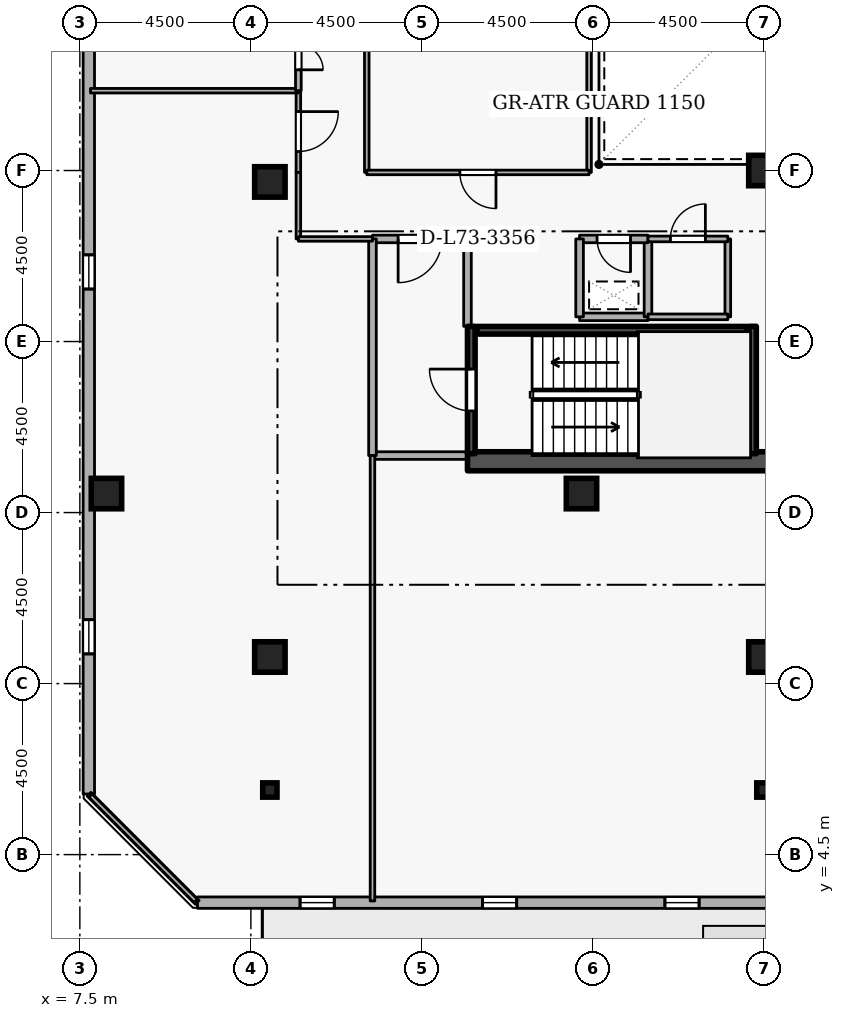
"""IFC4 building model, lengths in metres.
Left out: names, types, materials, properties, quantities, classifications, styles, units other than length and angle.
Written with IfcOpenShell. Run it as: python <this file> out.ifc"""

import sys

from ifc_helpers import new_model, si_unit, direction, frame, frame_2d, origin, origin_2d, place, context, subcontext, project, spatial, rectangle, i_section, extrude, element, fill, save


model = new_model("IFC4")
c1 = context("Model", 3, precision=1e-05, world=origin(), true_north=direction((0.0, 1.0)))
c2 = subcontext(c1, "Body", "Model", "MODEL_VIEW")
j1 = project(units=[si_unit("LENGTHUNIT", "METRE"), si_unit("PLANEANGLEUNIT", "RADIAN")], contexts=[c1])
p1 = place(None, origin())
s1 = spatial("IfcSite", under=j1, at=p1, CompositionType="ELEMENT")
p2 = place(p1, origin())
s2 = spatial("IfcBuilding", under=s1, at=p2, CompositionType="ELEMENT")
p3 = place(p2, frame((0.0, 0.0, 272.7)))
s3 = spatial("IfcBuildingStorey", under=s2, at=p3, CompositionType="ELEMENT", Elevation=272.7)
p4 = place(p3, frame((17.7, 14.85, 0.0), z_axis=(0.0, 0.0, 1.0), x_axis=(1.0, 0.0, 0.0)))
e1 = element("IfcWall", 1, at=p4, inside=s3, PredefinedType="SHEAR", context=c2, shape_type="SweptSolid", body=[
    extrude(rectangle(XDim=15.6, YDim=0.5, at=frame_2d((7.8, 0.0))), origin(), (0.0, 0.0, 1.0), 3.6),
])
for number, where, z_axis, x_axis in (
    (2, (12.5, 9.7, 0.0), (0.0, 0.0, 1.0), (1.0, 0.0, 0.0)),
    (3, (25.5, 9.7, 0.0), (0.0, 0.0, 1.0), (1.0, 0.0, 0.0)),
    (4, (8.2, 14.0, 0.0), (0.0, 0.0, 1.0), (1.0, 0.0, 0.0)),
    (5, (12.5, 22.2, 0.0), (0.0, 0.0, 1.0), (1.0, 0.0, 0.0)),
    (6, (20.7, 14.0, 0.0), (0.0, 0.0, 1.0), (1.0, 0.0, 0.0)),
    (7, (25.5, 22.5, 0.0), (0.0, 0.0, 1.0), (1.0, 0.0, 0.0)),
):
    element("IfcColumn", number, at=place(p3, frame(where, z_axis=z_axis, x_axis=x_axis)), inside=s3, PredefinedType="COLUMN", context=c2, shape_type="SweptSolid", body=[
        extrude(rectangle(XDim=0.8, YDim=0.8, at=origin_2d()), origin(), (0.0, 0.0, 1.0), 3.6),
    ])
for number, where, z_axis, x_axis in (
    (8, (12.5, 6.2, 0.0), (0.0, 0.0, 1.0), (1.0, 0.0, 0.0)),
    (9, (25.5, 6.2, 0.0), (0.0, 0.0, 1.0), (1.0, 0.0, 0.0)),
):
    element("IfcColumn", number, at=place(p3, frame(where, z_axis=z_axis, x_axis=x_axis)), inside=s3, PredefinedType="COLUMN", context=c2, shape_type="SweptSolid", body=[
        extrude(i_section(OverallWidth=0.375, OverallDepth=0.375, WebThickness=0.017, FlangeThickness=0.027, FilletRadius=0.015, at=origin_2d()), origin(), (0.0, 0.0, 1.0), 3.6),
    ])
p5 = place(p3, frame((10.594, 3.236, 0.0), z_axis=(0.0, 0.0, 1.0), x_axis=(0.999999999634, -2.7061402e-05, 0.0)))
e10 = element("IfcWall", 10, at=p5, inside=s3, PredefinedType="STANDARD", context=c2, shape_type="SweptSolid", body=[
    extrude(rectangle(XDim=36.087, YDim=0.3, at=frame_2d((18.043, 0.0))), origin(), (0.0, 0.0, 1.0), 2.7),
])
p6 = place(p5, frame((22.993, 0.0, 0.0)))
e11 = element("IfcOpeningElement", 11, at=p6, cuts=e10, PredefinedType="OPENING", context=c2, shape_type="SweptSolid", body=[
    extrude(rectangle(XDim=1.0, YDim=2.08, at=frame_2d((0.5, 1.04))), frame((0.0, 0.16, 0.0), z_axis=(0.0, -1.0, 0.0), x_axis=(1.0, 0.0, 0.0)), (0.0, 0.0, 1.0), 0.32),
])
p7 = place(p5, frame((2.7, 0.0, 0.72)))
e12 = element("IfcOpeningElement", 12, at=p7, cuts=e10, PredefinedType="OPENING", context=c2, shape_type="SweptSolid", body=[
    extrude(rectangle(XDim=0.9, YDim=1.75, at=frame_2d((0.45, 0.875))), frame((0.0, 0.16, 0.0), z_axis=(0.0, -1.0, 0.0), x_axis=(1.0, 0.0, 0.0)), (0.0, 0.0, 1.0), 0.32),
])
p8 = place(p5, frame((7.5, 0.0, 0.72)))
e13 = element("IfcOpeningElement", 13, at=p8, cuts=e10, PredefinedType="OPENING", context=c2, shape_type="SweptSolid", body=[
    extrude(rectangle(XDim=0.9, YDim=1.75, at=frame_2d((0.45, 0.875))), frame((0.0, 0.16, 0.0), z_axis=(0.0, -1.0, 0.0), x_axis=(1.0, 0.0, 0.0)), (0.0, 0.0, 1.0), 0.32),
])
p9 = place(p5, frame((12.3, 0.0, 0.72)))
e14 = element("IfcOpeningElement", 14, at=p9, cuts=e10, PredefinedType="OPENING", context=c2, shape_type="SweptSolid", body=[
    extrude(rectangle(XDim=0.9, YDim=1.75, at=frame_2d((0.45, 0.875))), frame((0.0, 0.16, 0.0), z_axis=(0.0, -1.0, 0.0), x_axis=(1.0, 0.0, 0.0)), (0.0, 0.0, 1.0), 0.32),
])
p10 = place(p5, frame((17.1, 0.0, 0.72)))
e15 = element("IfcOpeningElement", 15, at=p10, cuts=e10, PredefinedType="OPENING", context=c2, shape_type="SweptSolid", body=[
    extrude(rectangle(XDim=0.9, YDim=1.75, at=frame_2d((0.45, 0.875))), frame((0.0, 0.16, 0.0), z_axis=(0.0, -1.0, 0.0), x_axis=(1.0, 0.0, 0.0)), (0.0, 0.0, 1.0), 0.32),
])
p11 = place(p5, frame((26.7, 0.0, 0.72)))
e16 = element("IfcOpeningElement", 16, at=p11, cuts=e10, PredefinedType="OPENING", context=c2, shape_type="SweptSolid", body=[
    extrude(rectangle(XDim=0.9, YDim=1.75, at=frame_2d((0.45, 0.875))), frame((0.0, 0.16, 0.0), z_axis=(0.0, -1.0, 0.0), x_axis=(1.0, 0.0, 0.0)), (0.0, 0.0, 1.0), 0.32),
])
p12 = place(p5, frame((31.5, 0.0, 0.72)))
e17 = element("IfcOpeningElement", 17, at=p12, cuts=e10, PredefinedType="OPENING", context=c2, shape_type="SweptSolid", body=[
    extrude(rectangle(XDim=0.9, YDim=1.75, at=frame_2d((0.45, 0.875))), frame((0.0, 0.16, 0.0), z_axis=(0.0, -1.0, 0.0), x_axis=(1.0, 0.0, 0.0)), (0.0, 0.0, 1.0), 0.32),
])
p13 = place(p3, frame((7.735, 42.181, 0.0), z_axis=(0.0, 0.0, 1.0), x_axis=(2.7061402e-05, -0.999999999634, 0.0)))
e18 = element("IfcWall", 18, at=p13, inside=s3, PredefinedType="STANDARD", context=c2, shape_type="SweptSolid", body=[
    extrude(rectangle(XDim=36.087, YDim=0.3, at=frame_2d((18.043, 0.0))), origin(), (0.0, 0.0, 1.0), 2.7),
])
p14 = place(p13, frame((7.5, 0.0, 0.72)))
e19 = element("IfcOpeningElement", 19, at=p14, cuts=e18, PredefinedType="OPENING", context=c2, shape_type="SweptSolid", body=[
    extrude(rectangle(XDim=0.9, YDim=1.75, at=frame_2d((0.45, 0.875))), frame((0.0, 0.16, 0.0), z_axis=(0.0, -1.0, 0.0), x_axis=(1.0, 0.0, 0.0)), (0.0, 0.0, 1.0), 0.32),
])
p15 = place(p13, frame((21.9, 0.0, 0.72)))
e20 = element("IfcOpeningElement", 20, at=p15, cuts=e18, PredefinedType="OPENING", context=c2, shape_type="SweptSolid", body=[
    extrude(rectangle(XDim=0.9, YDim=1.75, at=frame_2d((0.45, 0.875))), frame((0.0, 0.16, 0.0), z_axis=(0.0, -1.0, 0.0), x_axis=(1.0, 0.0, 0.0)), (0.0, 0.0, 1.0), 0.32),
])
p16 = place(p13, frame((31.5, 0.0, 0.72)))
e21 = element("IfcOpeningElement", 21, at=p16, cuts=e18, PredefinedType="OPENING", context=c2, shape_type="SweptSolid", body=[
    extrude(rectangle(XDim=0.9, YDim=1.75, at=frame_2d((0.45, 0.875))), frame((0.0, 0.16, 0.0), z_axis=(0.0, -1.0, 0.0), x_axis=(1.0, 0.0, 0.0)), (0.0, 0.0, 1.0), 0.32),
])
p17 = place(p3, frame((17.8, 15.05, 0.0), z_axis=(0.0, 0.0, 1.0), x_axis=(0.0, 1.0, 0.0)))
e22 = element("IfcWall", 22, at=p17, inside=s3, PredefinedType="SHEAR", context=c2, shape_type="SweptSolid", body=[
    extrude(rectangle(XDim=3.35, YDim=0.2, at=frame_2d((1.675, 0.0))), origin(), (0.0, 0.0, 1.0), 3.6),
])
p18 = place(p17, frame((1.125, 0.0, 0.0)))
e23 = element("IfcOpeningElement", 23, at=p18, cuts=e22, PredefinedType="OPENING", context=c2, shape_type="SweptSolid", body=[
    extrude(rectangle(XDim=1.1, YDim=2.1, at=frame_2d((0.55, 1.05))), frame((0.0, 0.11, 0.0), z_axis=(0.0, -1.0, 0.0), x_axis=(1.0, 0.0, 0.0)), (0.0, 0.0, 1.0), 0.22),
])
p19 = place(p3, frame((25.2, 18.4, 0.0), z_axis=(0.0, 0.0, 1.0), x_axis=(0.0, -1.0, 0.0)))
e24 = element("IfcWall", 24, at=p19, inside=s3, PredefinedType="SHEAR", context=c2, shape_type="SweptSolid", body=[
    extrude(rectangle(XDim=3.35, YDim=0.2, at=frame_2d((1.675, 0.0))), origin(), (0.0, 0.0, 1.0), 3.6),
])
p20 = place(p3, frame((25.05, 18.297, 0.0), z_axis=(0.0, 0.0, 1.0), x_axis=(-1.0, 0.0, 0.0)))
e25 = element("IfcWall", 25, at=p20, inside=s3, PredefinedType="SHEAR", context=c2, shape_type="SweptSolid", body=[
    extrude(rectangle(XDim=7.1, YDim=0.2, at=frame_2d((3.55, 0.0))), origin(), (0.0, 0.0, 1.0), 3.6),
])
p21 = place(p3, frame((15.2, 15.0, 0.0), z_axis=(0.0, 0.0, 1.0), x_axis=(1.0, 0.0, 0.0)))
e26 = element("IfcWall", 26, at=p21, inside=s3, PredefinedType="STANDARD", context=c2, shape_type="SweptSolid", body=[
    extrude(rectangle(XDim=2.5, YDim=0.2, at=frame_2d((1.25, 0.0))), origin(), (0.0, 0.0, 1.0), 3.34),
])
p22 = place(p3, frame((17.7, 18.4, 0.0), z_axis=(0.0, 0.0, 1.0), x_axis=(0.0, 1.0, 0.0)))
e27 = element("IfcWall", 27, at=p22, inside=s3, PredefinedType="STANDARD", context=c2, shape_type="SweptSolid", body=[
    extrude(rectangle(XDim=2.3, YDim=0.2, at=frame_2d((1.15, 0.0))), origin(), (0.0, 0.0, 1.0), 2.545),
])
p23 = place(p3, frame((17.7, 20.7, 0.0), z_axis=(0.0, 0.0, 1.0), x_axis=(-1.0, 0.0, 0.0)))
e28 = element("IfcWall", 28, at=p23, inside=s3, PredefinedType="STANDARD", context=c2, shape_type="SweptSolid", body=[
    extrude(rectangle(XDim=2.5, YDim=0.2, at=frame_2d((1.25, 0.0))), origin(), (0.0, 0.0, 1.0), 3.34),
])
p24 = place(p23, frame((0.675, 0.0, 0.0)))
e29 = element("IfcOpeningElement", 29, at=p24, cuts=e28, PredefinedType="OPENING", context=c2, shape_type="SweptSolid", body=[
    extrude(rectangle(XDim=1.15, YDim=2.1, at=frame_2d((0.575, 1.05))), frame((0.0, 0.11, 0.0), z_axis=(0.0, -1.0, 0.0), x_axis=(1.0, 0.0, 0.0)), (0.0, 0.0, 1.0), 0.22),
])
p25 = place(p3, frame((15.2, 20.7, 0.0), z_axis=(0.0, 0.0, 1.0), x_axis=(0.0, -1.0, 0.0)))
e30 = element("IfcWall", 30, at=p25, inside=s3, PredefinedType="STANDARD", context=c2, shape_type="SweptSolid", body=[
    extrude(rectangle(XDim=5.7, YDim=0.2, at=frame_2d((2.85, 0.0))), origin(), (0.0, 0.0, 1.0), 3.34),
])
p26 = place(p3, frame((20.65, 18.65, 0.0), z_axis=(0.0, 0.0, 1.0), x_axis=(1.0, 0.0, 0.0)))
e31 = element("IfcWall", 31, at=p26, inside=s3, PredefinedType="STANDARD", context=c2, shape_type="SweptSolid", body=[
    extrude(rectangle(XDim=1.8, YDim=0.2, at=frame_2d((0.9, 0.0))), origin(), (0.0, 0.0, 1.0), 3.34),
])
p27 = place(p3, frame((22.45, 18.65, 0.0), z_axis=(0.0, 0.0, 1.0), x_axis=(0.0, 1.0, 0.0)))
e32 = element("IfcWall", 32, at=p27, inside=s3, PredefinedType="STANDARD", context=c2, shape_type="SweptSolid", body=[
    extrude(rectangle(XDim=2.05, YDim=0.2, at=frame_2d((1.025, 0.0))), origin(), (0.0, 0.0, 1.0), 3.34),
])
p28 = place(p3, frame((22.45, 20.7, 0.0), z_axis=(0.0, 0.0, 1.0), x_axis=(-1.0, 0.0, 0.0)))
e33 = element("IfcWall", 33, at=p28, inside=s3, PredefinedType="STANDARD", context=c2, shape_type="SweptSolid", body=[
    extrude(rectangle(XDim=1.8, YDim=0.2, at=frame_2d((0.9, 0.0))), origin(), (0.0, 0.0, 1.0), 3.34),
])
p29 = place(p28, frame((0.46, 0.0, 0.0)))
e34 = element("IfcOpeningElement", 34, at=p29, cuts=e33, PredefinedType="OPENING", context=c2, shape_type="SweptSolid", body=[
    extrude(rectangle(XDim=0.88, YDim=2.04, at=frame_2d((0.44, 1.02))), frame((0.0, 0.11, 0.0), z_axis=(0.0, -1.0, 0.0), x_axis=(1.0, 0.0, 0.0)), (0.0, 0.0, 1.0), 0.22),
])
p30 = place(p3, frame((20.65, 20.7, 0.0), z_axis=(0.0, 0.0, 1.0), x_axis=(0.0, -1.0, 0.0)))
e35 = element("IfcWall", 35, at=p30, inside=s3, PredefinedType="STANDARD", context=c2, shape_type="SweptSolid", body=[
    extrude(rectangle(XDim=2.05, YDim=0.2, at=frame_2d((1.025, 0.0))), origin(), (0.0, 0.0, 1.0), 3.34),
])
p31 = place(p3, frame((24.55, 20.7, 0.0), z_axis=(0.0, 0.0, 1.0), x_axis=(0.0, -1.0, 0.0)))
e36 = element("IfcWall", 36, at=p31, inside=s3, PredefinedType="PARTITIONING", context=c2, shape_type="SweptSolid", body=[
    extrude(rectangle(XDim=2.05, YDim=0.15, at=frame_2d((1.025, 0.0))), origin(), (0.0, 0.0, 1.0), 3.34),
])
p32 = place(p3, frame((24.55, 18.65, 0.0), z_axis=(0.0, 0.0, 1.0), x_axis=(-1.0, 0.0, 0.0)))
e37 = element("IfcWall", 37, at=p32, inside=s3, PredefinedType="PARTITIONING", context=c2, shape_type="SweptSolid", body=[
    extrude(rectangle(XDim=2.1, YDim=0.15, at=frame_2d((1.05, 0.0))), origin(), (0.0, 0.0, 1.0), 3.34),
])
p33 = place(p3, frame((22.45, 20.7, 0.0), z_axis=(0.0, 0.0, 1.0), x_axis=(1.0, 0.0, 0.0)))
e38 = element("IfcWall", 38, at=p33, inside=s3, PredefinedType="PARTITIONING", context=c2, shape_type="SweptSolid", body=[
    extrude(rectangle(XDim=2.1, YDim=0.15, at=frame_2d((1.05, 0.0))), origin(), (0.0, 0.0, 1.0), 3.34),
])
p34 = place(p33, frame((0.59, 0.0, 0.0)))
e39 = element("IfcOpeningElement", 39, at=p34, cuts=e38, PredefinedType="OPENING", context=c2, shape_type="SweptSolid", body=[
    extrude(rectangle(XDim=0.92, YDim=2.08, at=frame_2d((0.46, 1.04))), frame((0.0, 0.085, 0.0), z_axis=(0.0, -1.0, 0.0), x_axis=(1.0, 0.0, 0.0)), (0.0, 0.0, 1.0), 0.17),
])
p35 = place(p3, frame((13.25, 24.6, 0.0), z_axis=(0.0, 0.0, 1.0), x_axis=(0.0, -1.0, 0.0)))
e40 = element("IfcWall", 40, at=p35, inside=s3, PredefinedType="PARTITIONING", context=c2, shape_type="SweptSolid", body=[
    extrude(rectangle(XDim=2.15, YDim=0.12, at=frame_2d((1.075, 0.0))), origin(), (0.0, 0.0, 1.0), 3.34),
])
p36 = place(p35, frame((0.55, 0.0, 0.0)))
e41 = element("IfcOpeningElement", 41, at=p36, cuts=e40, PredefinedType="OPENING", context=c2, shape_type="SweptSolid", body=[
    extrude(rectangle(XDim=1.05, YDim=2.1, at=frame_2d((0.525, 1.05))), frame((0.0, 0.07, 0.0), z_axis=(0.0, -1.0, 0.0), x_axis=(1.0, 0.0, 0.0)), (0.0, 0.0, 1.0), 0.14),
])
p37 = place(p3, frame((13.25, 22.45, 0.0), z_axis=(0.0, 0.0, 1.0), x_axis=(0.0, -1.0, 0.0)))
e42 = element("IfcWall", 42, at=p37, inside=s3, PredefinedType="PARTITIONING", context=c2, shape_type="SweptSolid", body=[
    extrude(rectangle(XDim=1.75, YDim=0.12, at=frame_2d((0.875, 0.0))), origin(), (0.0, 0.0, 1.0), 3.34),
])
p38 = place(p3, frame((13.25, 20.7, 0.0), z_axis=(0.0, 0.0, 1.0), x_axis=(1.0, 0.0, 0.0)))
e43 = element("IfcWall", 43, at=p38, inside=s3, PredefinedType="PARTITIONING", context=c2, shape_type="SweptSolid", body=[
    extrude(rectangle(XDim=1.95, YDim=0.12, at=frame_2d((0.975, 0.0))), origin(), (0.0, 0.0, 1.0), 3.34),
])
p39 = place(p3, frame((15.2, 15.0, 0.0), z_axis=(0.0, 0.0, 1.0), x_axis=(0.0, -1.0, 0.0)))
e44 = element("IfcWall", 44, at=p39, inside=s3, PredefinedType="PARTITIONING", context=c2, shape_type="SweptSolid", body=[
    extrude(rectangle(XDim=11.72, YDim=0.12, at=frame_2d((5.86, 0.0))), origin(), (0.0, 0.0, 1.0), 3.34),
])
p40 = place(p3, frame((10.552, 3.28, 0.0), z_axis=(0.0, 0.0, 1.0), x_axis=(-0.707106781187, 0.707106781187, 0.0)))
e45 = element("IfcWall", 45, at=p40, inside=s3, PredefinedType="PARTITIONING", context=c2, shape_type="SweptSolid", body=[
    extrude(rectangle(XDim=3.919, YDim=0.12, at=frame_2d((1.96, 0.0))), origin(), (0.0, 0.0, 1.0), 3.34),
])
p41 = place(p3, frame((7.78, 24.6, 0.0), z_axis=(0.0, 0.0, 1.0), x_axis=(1.0, 0.0, 0.0)))
e46 = element("IfcWall", 46, at=p41, inside=s3, PredefinedType="PARTITIONING", context=c2, shape_type="SweptSolid", body=[
    extrude(rectangle(XDim=5.47, YDim=0.12, at=frame_2d((2.735, 0.0))), origin(), (0.0, 0.0, 1.0), 3.34),
])
p42 = place(p3, frame((13.25, 27.0, 0.0), z_axis=(0.0, 0.0, 1.0), x_axis=(0.0, -1.0, 0.0)))
e47 = element("IfcWall", 47, at=p42, inside=s3, PredefinedType="PARTITIONING", context=c2, shape_type="SweptSolid", body=[
    extrude(rectangle(XDim=2.4, YDim=0.15, at=frame_2d((1.2, 0.0))), origin(), (0.0, 0.0, 1.0), 3.34),
])
p43 = place(p42, frame((0.55, 0.0, 0.0)))
e48 = element("IfcOpeningElement", 48, at=p43, cuts=e47, PredefinedType="OPENING", context=c2, shape_type="SweptSolid", body=[
    extrude(rectangle(XDim=1.3, YDim=2.12, at=frame_2d((0.65, 1.06))), frame((0.0, 0.085, 0.0), z_axis=(0.0, -1.0, 0.0), x_axis=(1.0, 0.0, 0.0)), (0.0, 0.0, 1.0), 0.17),
])
for number, where, z_axis, x_axis in (
    (49, (15.05, 22.45, 0.0), (0.0, 0.0, 1.0), (0.0, 1.0, 0.0)),
    (50, (20.9, 26.2, 0.0), (0.0, 0.0, 1.0), (0.0, -1.0, 0.0)),
):
    element("IfcWall", number, at=place(p3, frame(where, z_axis=z_axis, x_axis=x_axis)), inside=s3, PredefinedType="PARTITIONING", context=c2, shape_type="SweptSolid", body=[
        extrude(rectangle(XDim=3.75, YDim=0.12, at=frame_2d((1.875, 0.0))), origin(), (0.0, 0.0, 1.0), 3.34),
    ])
p44 = place(p3, frame((20.9, 22.45, 0.0), z_axis=(0.0, 0.0, 1.0), x_axis=(-1.0, 0.0, 0.0)))
e51 = element("IfcWall", 51, at=p44, inside=s3, PredefinedType="PARTITIONING", context=c2, shape_type="SweptSolid", body=[
    extrude(rectangle(XDim=5.85, YDim=0.12, at=frame_2d((2.925, 0.0))), origin(), (0.0, 0.0, 1.0), 3.34),
])
p45 = place(p44, frame((2.45, 0.0, 0.0)))
e52 = element("IfcOpeningElement", 52, at=p45, cuts=e51, PredefinedType="OPENING", context=c2, shape_type="SweptSolid", body=[
    extrude(rectangle(XDim=0.95, YDim=2.1, at=frame_2d((0.475, 1.05))), frame((0.0, 0.07, 0.0), z_axis=(0.0, -1.0, 0.0), x_axis=(1.0, 0.0, 0.0)), (0.0, 0.0, 1.0), 0.14),
])
p46 = place(p7, origin())
e53 = element("IfcWindow", 53, at=p46, inside=s3, PartitioningType="SINGLE_PANEL", PredefinedType="WINDOW", context=c2, shape_type="SweptSolid", body=[
    extrude(rectangle(XDim=0.9, YDim=1.75, at=frame_2d((0.45, 0.875))), frame((0.0, 0.03, 0.0), z_axis=(0.0, -1.0, 0.0), x_axis=(1.0, 0.0, 0.0)), (0.0, 0.0, 1.0), 0.06),
])
fill(e12, e53)
p47 = place(p8, origin())
e54 = element("IfcWindow", 54, at=p47, inside=s3, PartitioningType="SINGLE_PANEL", PredefinedType="WINDOW", context=c2, shape_type="SweptSolid", body=[
    extrude(rectangle(XDim=0.9, YDim=1.75, at=frame_2d((0.45, 0.875))), frame((0.0, 0.03, 0.0), z_axis=(0.0, -1.0, 0.0), x_axis=(1.0, 0.0, 0.0)), (0.0, 0.0, 1.0), 0.06),
])
fill(e13, e54)
p48 = place(p9, origin())
e55 = element("IfcWindow", 55, at=p48, inside=s3, PartitioningType="SINGLE_PANEL", PredefinedType="WINDOW", context=c2, shape_type="SweptSolid", body=[
    extrude(rectangle(XDim=0.9, YDim=1.75, at=frame_2d((0.45, 0.875))), frame((0.0, 0.03, 0.0), z_axis=(0.0, -1.0, 0.0), x_axis=(1.0, 0.0, 0.0)), (0.0, 0.0, 1.0), 0.06),
])
fill(e14, e55)
p49 = place(p15, origin())
e56 = element("IfcWindow", 56, at=p49, inside=s3, PartitioningType="SINGLE_PANEL", PredefinedType="WINDOW", context=c2, shape_type="SweptSolid", body=[
    extrude(rectangle(XDim=0.9, YDim=1.75, at=frame_2d((0.45, 0.875))), frame((0.0, 0.03, 0.0), z_axis=(0.0, -1.0, 0.0), x_axis=(1.0, 0.0, 0.0)), (0.0, 0.0, 1.0), 0.06),
])
fill(e20, e56)
p50 = place(p16, origin())
e57 = element("IfcWindow", 57, at=p50, inside=s3, PartitioningType="SINGLE_PANEL", PredefinedType="WINDOW", context=c2, shape_type="SweptSolid", body=[
    extrude(rectangle(XDim=0.9, YDim=1.75, at=frame_2d((0.45, 0.875))), frame((0.0, 0.03, 0.0), z_axis=(0.0, -1.0, 0.0), x_axis=(1.0, 0.0, 0.0)), (0.0, 0.0, 1.0), 0.06),
])
fill(e21, e57)
p51 = place(p18, origin())
e58 = element("IfcDoor", 58, at=p51, inside=s3, OperationType="SINGLE_SWING_RIGHT", PredefinedType="DOOR", context=c2, shape_type="SweptSolid", body=[
    extrude(rectangle(XDim=1.1, YDim=2.1, at=frame_2d((0.55, 1.05))), frame((0.0, 0.025, 0.0), z_axis=(0.0, -1.0, 0.0), x_axis=(1.0, 0.0, 0.0)), (0.0, 0.0, 1.0), 0.05),
])
fill(e23, e58)
p52 = place(p24, origin())
e59 = element("IfcDoor", 59, at=p52, inside=s3, OperationType="SINGLE_SWING_RIGHT", PredefinedType="DOOR", context=c2, shape_type="SweptSolid", body=[
    extrude(rectangle(XDim=1.15, YDim=2.1, at=frame_2d((0.575, 1.05))), frame((0.0, 0.025, 0.0), z_axis=(0.0, -1.0, 0.0), x_axis=(1.0, 0.0, 0.0)), (0.0, 0.0, 1.0), 0.05),
])
fill(e29, e59)
p53 = place(p29, origin())
e60 = element("IfcDoor", 60, at=p53, inside=s3, OperationType="SINGLE_SWING_LEFT", PredefinedType="DOOR", context=c2, shape_type="SweptSolid", body=[
    extrude(rectangle(XDim=0.88, YDim=2.04, at=frame_2d((0.44, 1.02))), frame((0.0, 0.025, 0.0), z_axis=(0.0, -1.0, 0.0), x_axis=(1.0, 0.0, 0.0)), (0.0, 0.0, 1.0), 0.05),
])
fill(e34, e60)
p54 = place(p34, origin())
e61 = element("IfcDoor", 61, at=p54, inside=s3, OperationType="SINGLE_SWING_RIGHT", PredefinedType="DOOR", context=c2, shape_type="SweptSolid", body=[
    extrude(rectangle(XDim=0.92, YDim=2.08, at=frame_2d((0.46, 1.04))), frame((0.0, 0.025, 0.0), z_axis=(0.0, -1.0, 0.0), x_axis=(1.0, 0.0, 0.0)), (0.0, 0.0, 1.0), 0.05),
])
fill(e39, e61)
p55 = place(p36, origin())
e62 = element("IfcDoor", 62, at=p55, inside=s3, OperationType="SINGLE_SWING_LEFT", PredefinedType="DOOR", context=c2, shape_type="SweptSolid", body=[
    extrude(rectangle(XDim=1.05, YDim=2.1, at=frame_2d((0.525, 1.05))), frame((0.0, 0.025, 0.0), z_axis=(0.0, -1.0, 0.0), x_axis=(1.0, 0.0, 0.0)), (0.0, 0.0, 1.0), 0.05),
])
fill(e41, e62)
p56 = place(p43, origin())
e63 = element("IfcDoor", 63, at=p56, inside=s3, OperationType="DOUBLE_DOOR_SINGLE_SWING", PredefinedType="DOOR", context=c2, shape_type="SweptSolid", body=[
    extrude(rectangle(XDim=1.3, YDim=2.12, at=frame_2d((0.65, 1.06))), frame((0.0, 0.025, 0.0), z_axis=(0.0, -1.0, 0.0), x_axis=(1.0, 0.0, 0.0)), (0.0, 0.0, 1.0), 0.05),
])
fill(e48, e63)
p57 = place(p45, origin())
e64 = element("IfcDoor", 64, at=p57, inside=s3, OperationType="SINGLE_SWING_LEFT", PredefinedType="DOOR", context=c2, shape_type="SweptSolid", body=[
    extrude(rectangle(XDim=0.95, YDim=2.1, at=frame_2d((0.475, 1.05))), frame((0.0, 0.025, 0.0), z_axis=(0.0, -1.0, 0.0), x_axis=(1.0, 0.0, 0.0)), (0.0, 0.0, 1.0), 0.05),
])
fill(e52, e64)
save(model, sys.argv[1])
